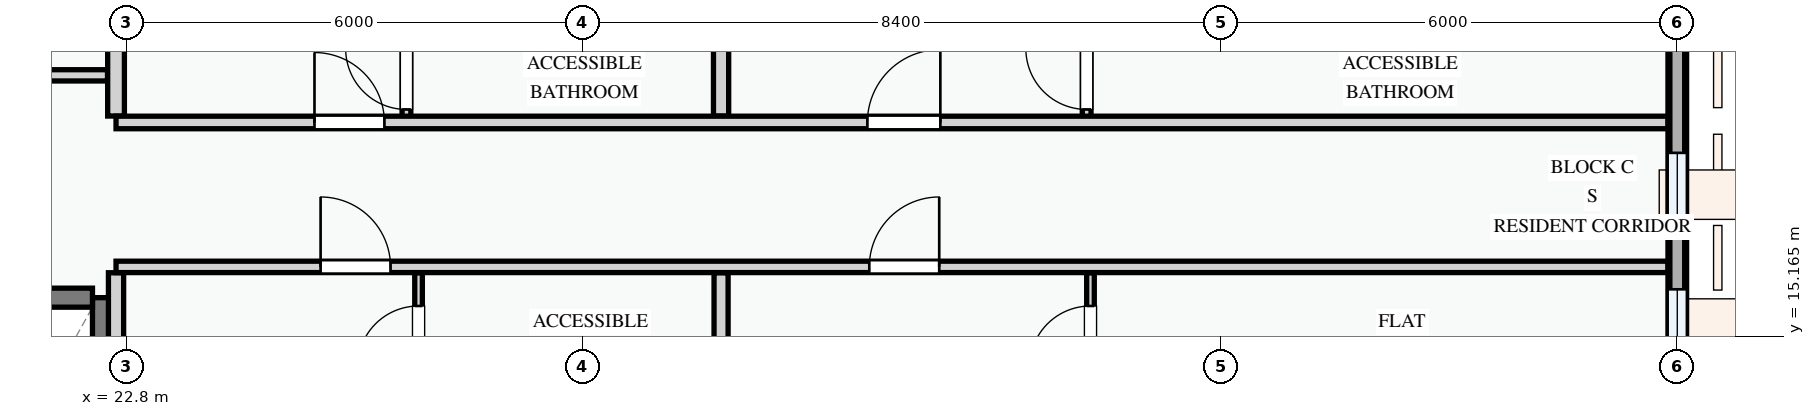
"""IFC4 building model, lengths in metres.
Left out: names, types, materials, properties, quantities, classifications, styles, units other than length and angle.
Written with IfcOpenShell. Run it as: python <this file> out.ifc"""

import sys

from ifc_helpers import new_model, si_unit, direction, frame, frame_2d, origin, place, context, subcontext, project, spatial, rectangle, extrude, element, fill, save


model = new_model("IFC4")
c1 = context("Model", 3, precision=1e-05, world=origin(), true_north=direction((0.0, 1.0)))
c2 = subcontext(c1, "Body", "Model", "MODEL_VIEW")
j1 = project(units=[si_unit("LENGTHUNIT", "METRE"), si_unit("PLANEANGLEUNIT", "RADIAN")], contexts=[c1])
p1 = place(None, origin())
s1 = spatial("IfcSite", under=j1, at=p1, CompositionType="ELEMENT")
p2 = place(p1, origin())
s2 = spatial("IfcBuilding", under=s1, at=p2, CompositionType="ELEMENT")
p3 = place(p2, frame((0.0, 0.0, 34.5)))
s3 = spatial("IfcBuildingStorey", under=s2, at=p3, CompositionType="ELEMENT", Elevation=34.5)
p4 = place(p3, frame((43.2, 14.4, 0.0), z_axis=(0.0, 0.0, 1.0), x_axis=(0.0, 1.0, 0.0)))
e1 = element("IfcWall", 1, at=p4, inside=s3, PredefinedType="STANDARD", context=c2, shape_type="SweptSolid", body=[
    extrude(rectangle(XDim=8.4, YDim=0.245, at=frame_2d((4.2, 0.0))), origin(), (0.0, 0.0, 1.0), 2.425),
])
p5 = place(p4, frame((0.485, 0.0, 0.78)))
e2 = element("IfcOpeningElement", 2, at=p5, cuts=e1, PredefinedType="OPENING", context=c2, shape_type="SweptSolid", body=[
    extrude(rectangle(XDim=0.9, YDim=1.2, at=frame_2d((0.45, 0.6))), frame((0.0, 0.133, 0.0), z_axis=(0.0, -1.0, 0.0), x_axis=(1.0, 0.0, 0.0)), (0.0, 0.0, 1.0), 0.265),
])
p6 = place(p4, frame((2.08, 0.0, 0.78)))
e3 = element("IfcOpeningElement", 3, at=p6, cuts=e1, PredefinedType="OPENING", context=c2, shape_type="SweptSolid", body=[
    extrude(rectangle(XDim=1.1, YDim=1.3, at=frame_2d((0.55, 0.65))), frame((0.0, 0.133, 0.0), z_axis=(0.0, -1.0, 0.0), x_axis=(1.0, 0.0, 0.0)), (0.0, 0.0, 1.0), 0.265),
])
p7 = place(p4, frame((6.558, 0.0, 0.78)))
e4 = element("IfcOpeningElement", 4, at=p7, cuts=e1, PredefinedType="OPENING", context=c2, shape_type="SweptSolid", body=[
    extrude(rectangle(XDim=1.15, YDim=1.25, at=frame_2d((0.575, 0.625))), frame((0.0, 0.133, 0.0), z_axis=(0.0, -1.0, 0.0), x_axis=(1.0, 0.0, 0.0)), (0.0, 0.0, 1.0), 0.265),
])
p8 = place(p3, frame((43.2, 8.4, 3.3), z_axis=(0.0, 0.0, 1.0), x_axis=(0.0, 1.0, 0.0)))
e5 = element("IfcWall", 5, at=p8, inside=s3, PredefinedType="PARAPET", context=c2, shape_type="SweptSolid", body=[
    extrude(rectangle(XDim=14.4, YDim=0.195, at=frame_2d((7.2, 0.0))), origin(), (0.0, 0.0, 1.0), 1.15),
])
p9 = place(p3, frame((22.475, 8.75, 0.0), z_axis=(0.0, 0.0, 1.0), x_axis=(0.0, 1.0, 0.0)))
e6 = element("IfcWall", 6, at=p9, inside=s3, PredefinedType="SHEAR", context=c2, shape_type="SweptSolid", body=[
    extrude(rectangle(XDim=6.925, YDim=0.25, at=frame_2d((3.462, 0.0))), origin(), (0.0, 0.0, 1.0), 3.0),
])
p10 = place(p3, frame((8.85, 15.675, 0.0), z_axis=(0.0, 0.0, 1.0), x_axis=(1.0, 0.0, 0.0)))
e7 = element("IfcWall", 7, at=p10, inside=s3, PredefinedType="SHEAR", context=c2, shape_type="SweptSolid", body=[
    extrude(rectangle(XDim=13.5, YDim=0.25, at=frame_2d((6.75, 0.0))), origin(), (0.0, 0.0, 1.0), 3.0),
])
p11 = place(p10, frame((6.2, 0.0, 0.0)))
e8 = element("IfcOpeningElement", 8, at=p11, cuts=e7, PredefinedType="OPENING", context=c2, shape_type="SweptSolid", body=[
    extrude(rectangle(XDim=1.1, YDim=2.15, at=frame_2d((0.55, 1.075))), frame((0.0, 0.135, 0.0), z_axis=(0.0, -1.0, 0.0), x_axis=(1.0, 0.0, 0.0)), (0.0, 0.0, 1.0), 0.27),
])
p12 = place(p3, frame((18.025, 18.6, 0.0), z_axis=(0.0, 0.0, 1.0), x_axis=(1.0, 0.0, 0.0)))
e9 = element("IfcWall", 9, at=p12, inside=s3, PredefinedType="PARTITIONING", context=c2, shape_type="SweptSolid", body=[
    extrude(rectangle(XDim=4.523, YDim=0.148, at=frame_2d((2.262, 0.0))), origin(), (0.0, 0.0, 1.0), 3.0),
])
p13 = place(p12, frame((1.65, 0.0, 0.0)))
e10 = element("IfcOpeningElement", 10, at=p13, cuts=e9, PredefinedType="OPENING", context=c2, shape_type="SweptSolid", body=[
    extrude(rectangle(XDim=1.0, YDim=2.15, at=frame_2d((0.5, 1.075))), frame((0.0, 0.084, 0.0), z_axis=(0.0, -1.0, 0.0), x_axis=(1.0, 0.0, 0.0)), (0.0, 0.0, 1.0), 0.168),
])
p14 = place(p3, frame((26.64, 8.524, 0.0), z_axis=(0.0, 0.0, 1.0), x_axis=(0.0, 1.0, 0.0)))
e11 = element("IfcWall", 11, at=p14, inside=s3, PredefinedType="PARTITIONING", context=c2, shape_type="SweptSolid", body=[
    extrude(rectangle(XDim=7.479, YDim=0.1, at=frame_2d((3.739, 0.0))), origin(), (0.0, 0.0, 1.0), 3.0),
])
p15 = place(p14, frame((1.339, 0.0, 0.0)))
e12 = element("IfcOpeningElement", 12, at=p15, cuts=e11, PredefinedType="OPENING", context=c2, shape_type="SweptSolid", body=[
    extrude(rectangle(XDim=0.85, YDim=2.1, at=frame_2d((0.425, 1.05))), frame((0.0, 0.06, 0.0), z_axis=(0.0, -1.0, 0.0), x_axis=(1.0, 0.0, 0.0)), (0.0, 0.0, 1.0), 0.12),
])
p16 = place(p14, frame((4.235, 0.0, 0.0)))
e13 = element("IfcOpeningElement", 13, at=p16, cuts=e11, PredefinedType="OPENING", context=c2, shape_type="SweptSolid", body=[
    extrude(rectangle(XDim=0.85, YDim=2.1, at=frame_2d((0.425, 1.05))), frame((0.0, 0.06, 0.0), z_axis=(0.0, -1.0, 0.0), x_axis=(1.0, 0.0, 0.0)), (0.0, 0.0, 1.0), 0.12),
])
p17 = place(p14, frame((6.241, 0.0, 0.0)))
e14 = element("IfcOpeningElement", 14, at=p17, cuts=e11, PredefinedType="OPENING", context=c2, shape_type="SweptSolid", body=[
    extrude(rectangle(XDim=0.8, YDim=2.1, at=frame_2d((0.4, 1.05))), frame((0.0, 0.06, 0.0), z_axis=(0.0, -1.0, 0.0), x_axis=(1.0, 0.0, 0.0)), (0.0, 0.0, 1.0), 0.12),
])
p18 = place(p3, frame((26.481, 17.98, 0.0), z_axis=(0.0, 0.0, 1.0), x_axis=(0.0, 1.0, 0.0)))
e15 = element("IfcWall", 15, at=p18, inside=s3, PredefinedType="PARTITIONING", context=c2, shape_type="SweptSolid", body=[
    extrude(rectangle(XDim=4.696, YDim=0.115, at=frame_2d((2.348, 0.0))), origin(), (0.0, 0.0, 1.0), 3.0),
])
p19 = place(p18, frame((0.171, 0.0, 0.0)))
e16 = element("IfcOpeningElement", 16, at=p19, cuts=e15, PredefinedType="OPENING", context=c2, shape_type="SweptSolid", body=[
    extrude(rectangle(XDim=0.8, YDim=2.1, at=frame_2d((0.4, 1.05))), frame((0.0, 0.067, 0.0), z_axis=(0.0, -1.0, 0.0), x_axis=(1.0, 0.0, 0.0)), (0.0, 0.0, 1.0), 0.135),
])
p20 = place(p18, frame((1.384, 0.0, 0.0)))
e17 = element("IfcOpeningElement", 17, at=p20, cuts=e15, PredefinedType="OPENING", context=c2, shape_type="SweptSolid", body=[
    extrude(rectangle(XDim=0.85, YDim=2.1, at=frame_2d((0.425, 1.05))), frame((0.0, 0.067, 0.0), z_axis=(0.0, -1.0, 0.0), x_axis=(1.0, 0.0, 0.0)), (0.0, 0.0, 1.0), 0.135),
])
p21 = place(p18, frame((3.193, 0.0, 0.0)))
e18 = element("IfcOpeningElement", 18, at=p21, cuts=e15, PredefinedType="OPENING", context=c2, shape_type="SweptSolid", body=[
    extrude(rectangle(XDim=0.85, YDim=2.1, at=frame_2d((0.425, 1.05))), frame((0.0, 0.067, 0.0), z_axis=(0.0, -1.0, 0.0), x_axis=(1.0, 0.0, 0.0)), (0.0, 0.0, 1.0), 0.135),
])
p22 = place(p3, frame((22.66, 8.524, 0.0), z_axis=(0.0, 0.0, 1.0), x_axis=(0.0, 1.0, 0.0)))
e19 = element("IfcWall", 19, at=p22, inside=s3, PredefinedType="PARTITIONING", context=c2, shape_type="SweptSolid", body=[
    extrude(rectangle(XDim=7.479, YDim=0.2, at=frame_2d((3.739, 0.0))), origin(), (0.0, 0.0, 1.0), 2.425),
])
p23 = place(p3, frame((22.66, 18.064, 0.0), z_axis=(0.0, 0.0, 1.0), x_axis=(0.0, 1.0, 0.0)))
e20 = element("IfcWall", 20, at=p23, inside=s3, PredefinedType="PARTITIONING", context=c2, shape_type="SweptSolid", body=[
    extrude(rectangle(XDim=4.676, YDim=0.22, at=frame_2d((2.338, 0.0))), origin(), (0.0, 0.0, 1.0), 2.425),
])
p24 = place(p3, frame((35.48, 8.524, 0.0), z_axis=(0.0, 0.0, 1.0), x_axis=(0.0, 1.0, 0.0)))
e21 = element("IfcWall", 21, at=p24, inside=s3, PredefinedType="PARTITIONING", context=c2, shape_type="SweptSolid", body=[
    extrude(rectangle(XDim=7.479, YDim=0.1, at=frame_2d((3.739, 0.0))), origin(), (0.0, 0.0, 1.0), 3.0),
])
p25 = place(p24, frame((1.339, 0.0, 0.0)))
e22 = element("IfcOpeningElement", 22, at=p25, cuts=e21, PredefinedType="OPENING", context=c2, shape_type="SweptSolid", body=[
    extrude(rectangle(XDim=0.82, YDim=2.08, at=frame_2d((0.41, 1.04))), frame((0.0, 0.06, 0.0), z_axis=(0.0, -1.0, 0.0), x_axis=(1.0, 0.0, 0.0)), (0.0, 0.0, 1.0), 0.12),
])
p26 = place(p24, frame((4.235, 0.0, 0.0)))
e23 = element("IfcOpeningElement", 23, at=p26, cuts=e21, PredefinedType="OPENING", context=c2, shape_type="SweptSolid", body=[
    extrude(rectangle(XDim=0.85, YDim=2.1, at=frame_2d((0.425, 1.05))), frame((0.0, 0.06, 0.0), z_axis=(0.0, -1.0, 0.0), x_axis=(1.0, 0.0, 0.0)), (0.0, 0.0, 1.0), 0.12),
])
p27 = place(p24, frame((6.241, 0.0, 0.0)))
e24 = element("IfcOpeningElement", 24, at=p27, cuts=e21, PredefinedType="OPENING", context=c2, shape_type="SweptSolid", body=[
    extrude(rectangle(XDim=0.8, YDim=2.1, at=frame_2d((0.4, 1.05))), frame((0.0, 0.06, 0.0), z_axis=(0.0, -1.0, 0.0), x_axis=(1.0, 0.0, 0.0)), (0.0, 0.0, 1.0), 0.12),
])
p28 = place(p3, frame((35.43, 17.98, 0.0), z_axis=(0.0, 0.0, 1.0), x_axis=(0.0, 1.0, 0.0)))
e25 = element("IfcWall", 25, at=p28, inside=s3, PredefinedType="PARTITIONING", context=c2, shape_type="SweptSolid", body=[
    extrude(rectangle(XDim=4.696, YDim=0.115, at=frame_2d((2.348, 0.0))), origin(), (0.0, 0.0, 1.0), 3.0),
])
p29 = place(p28, frame((0.171, 0.0, 0.0)))
e26 = element("IfcOpeningElement", 26, at=p29, cuts=e25, PredefinedType="OPENING", context=c2, shape_type="SweptSolid", body=[
    extrude(rectangle(XDim=0.8, YDim=2.1, at=frame_2d((0.4, 1.05))), frame((0.0, 0.067, 0.0), z_axis=(0.0, -1.0, 0.0), x_axis=(1.0, 0.0, 0.0)), (0.0, 0.0, 1.0), 0.135),
])
p30 = place(p28, frame((1.384, 0.0, 0.0)))
e27 = element("IfcOpeningElement", 27, at=p30, cuts=e25, PredefinedType="OPENING", context=c2, shape_type="SweptSolid", body=[
    extrude(rectangle(XDim=0.82, YDim=2.08, at=frame_2d((0.41, 1.04))), frame((0.0, 0.067, 0.0), z_axis=(0.0, -1.0, 0.0), x_axis=(1.0, 0.0, 0.0)), (0.0, 0.0, 1.0), 0.135),
])
p31 = place(p28, frame((3.193, 0.0, 0.0)))
e28 = element("IfcOpeningElement", 28, at=p31, cuts=e25, PredefinedType="OPENING", context=c2, shape_type="SweptSolid", body=[
    extrude(rectangle(XDim=0.85, YDim=2.1, at=frame_2d((0.425, 1.05))), frame((0.0, 0.067, 0.0), z_axis=(0.0, -1.0, 0.0), x_axis=(1.0, 0.0, 0.0)), (0.0, 0.0, 1.0), 0.135),
])
p32 = place(p3, frame((30.62, 8.524, 0.0), z_axis=(0.0, 0.0, 1.0), x_axis=(0.0, 1.0, 0.0)))
e29 = element("IfcWall", 29, at=p32, inside=s3, PredefinedType="PARTITIONING", context=c2, shape_type="SweptSolid", body=[
    extrude(rectangle(XDim=7.479, YDim=0.185, at=frame_2d((3.739, 0.0))), origin(), (0.0, 0.0, 1.0), 3.0),
])
p33 = place(p3, frame((30.62, 18.064, 0.0), z_axis=(0.0, 0.0, 1.0), x_axis=(0.0, 1.0, 0.0)))
e30 = element("IfcWall", 30, at=p33, inside=s3, PredefinedType="PARTITIONING", context=c2, shape_type="SweptSolid", body=[
    extrude(rectangle(XDim=4.611, YDim=0.2, at=frame_2d((2.306, 0.0))), origin(), (0.0, 0.0, 1.0), 3.0),
])
p34 = place(p3, frame((22.66, 16.08, 0.0), z_axis=(0.0, 0.0, 1.0), x_axis=(1.0, 0.0, 0.0)))
e31 = element("IfcWall", 31, at=p34, inside=s3, PredefinedType="PARTITIONING", context=c2, shape_type="SweptSolid", body=[
    extrude(rectangle(XDim=20.416, YDim=0.15, at=frame_2d((10.208, 0.0))), origin(), (0.0, 0.0, 1.0), 3.0),
])
p35 = place(p34, frame((2.691, 0.0, 0.0)))
e32 = element("IfcOpeningElement", 32, at=p35, cuts=e31, PredefinedType="OPENING", context=c2, shape_type="SweptSolid", body=[
    extrude(rectangle(XDim=0.92, YDim=2.1, at=frame_2d((0.46, 1.05))), frame((0.0, 0.085, 0.0), z_axis=(0.0, -1.0, 0.0), x_axis=(1.0, 0.0, 0.0)), (0.0, 0.0, 1.0), 0.17),
])
p36 = place(p34, frame((9.91, 0.0, 0.0)))
e33 = element("IfcOpeningElement", 33, at=p36, cuts=e31, PredefinedType="OPENING", context=c2, shape_type="SweptSolid", body=[
    extrude(rectangle(XDim=0.92, YDim=2.1, at=frame_2d((0.46, 1.05))), frame((0.0, 0.085, 0.0), z_axis=(0.0, -1.0, 0.0), x_axis=(1.0, 0.0, 0.0)), (0.0, 0.0, 1.0), 0.17),
])
p37 = place(p3, frame((22.66, 17.98, 0.0), z_axis=(0.0, 0.0, 1.0), x_axis=(1.0, 0.0, 0.0)))
e34 = element("IfcWall", 34, at=p37, inside=s3, PredefinedType="PARTITIONING", context=c2, shape_type="SweptSolid", body=[
    extrude(rectangle(XDim=20.416, YDim=0.165, at=frame_2d((10.208, 0.0))), origin(), (0.0, 0.0, 1.0), 3.0),
])
p38 = place(p37, frame((2.611, 0.0, 0.0)))
e35 = element("IfcOpeningElement", 35, at=p38, cuts=e34, PredefinedType="OPENING", context=c2, shape_type="SweptSolid", body=[
    extrude(rectangle(XDim=0.92, YDim=2.1, at=frame_2d((0.46, 1.05))), frame((0.0, 0.093, 0.0), z_axis=(0.0, -1.0, 0.0), x_axis=(1.0, 0.0, 0.0)), (0.0, 0.0, 1.0), 0.185),
])
p39 = place(p37, frame((9.885, 0.0, 0.0)))
e36 = element("IfcOpeningElement", 36, at=p39, cuts=e34, PredefinedType="OPENING", context=c2, shape_type="SweptSolid", body=[
    extrude(rectangle(XDim=0.96, YDim=2.12, at=frame_2d((0.48, 1.06))), frame((0.0, 0.093, 0.0), z_axis=(0.0, -1.0, 0.0), x_axis=(1.0, 0.0, 0.0)), (0.0, 0.0, 1.0), 0.185),
])
p40 = place(p5, origin())
e37 = element("IfcWindow", 37, at=p40, inside=s3, PartitioningType="SINGLE_PANEL", PredefinedType="WINDOW", context=c2, shape_type="SweptSolid", body=[
    extrude(rectangle(XDim=0.9, YDim=1.2, at=frame_2d((0.45, 0.6))), frame((0.0, 0.03, 0.0), z_axis=(0.0, -1.0, 0.0), x_axis=(1.0, 0.0, 0.0)), (0.0, 0.0, 1.0), 0.06),
])
fill(e2, e37)
p41 = place(p6, origin())
e38 = element("IfcWindow", 38, at=p41, inside=s3, PartitioningType="SINGLE_PANEL", PredefinedType="WINDOW", context=c2, shape_type="SweptSolid", body=[
    extrude(rectangle(XDim=1.1, YDim=1.3, at=frame_2d((0.55, 0.65))), frame((0.0, 0.03, 0.0), z_axis=(0.0, -1.0, 0.0), x_axis=(1.0, 0.0, 0.0)), (0.0, 0.0, 1.0), 0.06),
])
fill(e3, e38)
p42 = place(p17, origin())
e39 = element("IfcDoor", 39, at=p42, inside=s3, OperationType="SINGLE_SWING_LEFT", PredefinedType="DOOR", context=c2, shape_type="SweptSolid", body=[
    extrude(rectangle(XDim=0.8, YDim=2.1, at=frame_2d((0.4, 1.05))), frame((0.0, 0.025, 0.0), z_axis=(0.0, -1.0, 0.0), x_axis=(1.0, 0.0, 0.0)), (0.0, 0.0, 1.0), 0.05),
])
fill(e14, e39)
p43 = place(p19, origin())
e40 = element("IfcDoor", 40, at=p43, inside=s3, OperationType="SINGLE_SWING_RIGHT", PredefinedType="DOOR", context=c2, shape_type="SweptSolid", body=[
    extrude(rectangle(XDim=0.8, YDim=2.1, at=frame_2d((0.4, 1.05))), frame((0.0, 0.025, 0.0), z_axis=(0.0, -1.0, 0.0), x_axis=(1.0, 0.0, 0.0)), (0.0, 0.0, 1.0), 0.05),
])
fill(e16, e40)
p44 = place(p27, origin())
e41 = element("IfcDoor", 41, at=p44, inside=s3, OperationType="SINGLE_SWING_LEFT", PredefinedType="DOOR", context=c2, shape_type="SweptSolid", body=[
    extrude(rectangle(XDim=0.8, YDim=2.1, at=frame_2d((0.4, 1.05))), frame((0.0, 0.025, 0.0), z_axis=(0.0, -1.0, 0.0), x_axis=(1.0, 0.0, 0.0)), (0.0, 0.0, 1.0), 0.05),
])
fill(e24, e41)
p45 = place(p29, origin())
e42 = element("IfcDoor", 42, at=p45, inside=s3, OperationType="SINGLE_SWING_RIGHT", PredefinedType="DOOR", context=c2, shape_type="SweptSolid", body=[
    extrude(rectangle(XDim=0.8, YDim=2.1, at=frame_2d((0.4, 1.05))), frame((0.0, 0.025, 0.0), z_axis=(0.0, -1.0, 0.0), x_axis=(1.0, 0.0, 0.0)), (0.0, 0.0, 1.0), 0.05),
])
fill(e26, e42)
p46 = place(p35, origin())
e43 = element("IfcDoor", 43, at=p46, inside=s3, OperationType="SINGLE_SWING_LEFT", PredefinedType="DOOR", context=c2, shape_type="SweptSolid", body=[
    extrude(rectangle(XDim=0.92, YDim=2.1, at=frame_2d((0.46, 1.05))), frame((0.0, 0.025, 0.0), z_axis=(0.0, -1.0, 0.0), x_axis=(1.0, 0.0, 0.0)), (0.0, 0.0, 1.0), 0.05),
])
fill(e32, e43)
p47 = place(p36, origin())
e44 = element("IfcDoor", 44, at=p47, inside=s3, OperationType="SINGLE_SWING_RIGHT", PredefinedType="DOOR", context=c2, shape_type="SweptSolid", body=[
    extrude(rectangle(XDim=0.92, YDim=2.1, at=frame_2d((0.46, 1.05))), frame((0.0, 0.025, 0.0), z_axis=(0.0, -1.0, 0.0), x_axis=(1.0, 0.0, 0.0)), (0.0, 0.0, 1.0), 0.05),
])
fill(e33, e44)
p48 = place(p38, origin())
e45 = element("IfcDoor", 45, at=p48, inside=s3, OperationType="SINGLE_SWING_LEFT", PredefinedType="DOOR", context=c2, shape_type="SweptSolid", body=[
    extrude(rectangle(XDim=0.92, YDim=2.1, at=frame_2d((0.46, 1.05))), frame((0.0, 0.025, 0.0), z_axis=(0.0, -1.0, 0.0), x_axis=(1.0, 0.0, 0.0)), (0.0, 0.0, 1.0), 0.05),
])
fill(e35, e45)
p49 = place(p39, origin())
e46 = element("IfcDoor", 46, at=p49, inside=s3, OperationType="SINGLE_SWING_RIGHT", PredefinedType="DOOR", context=c2, shape_type="SweptSolid", body=[
    extrude(rectangle(XDim=0.96, YDim=2.12, at=frame_2d((0.48, 1.06))), frame((0.0, 0.025, 0.0), z_axis=(0.0, -1.0, 0.0), x_axis=(1.0, 0.0, 0.0)), (0.0, 0.0, 1.0), 0.05),
])
fill(e36, e46)
save(model, sys.argv[1])
